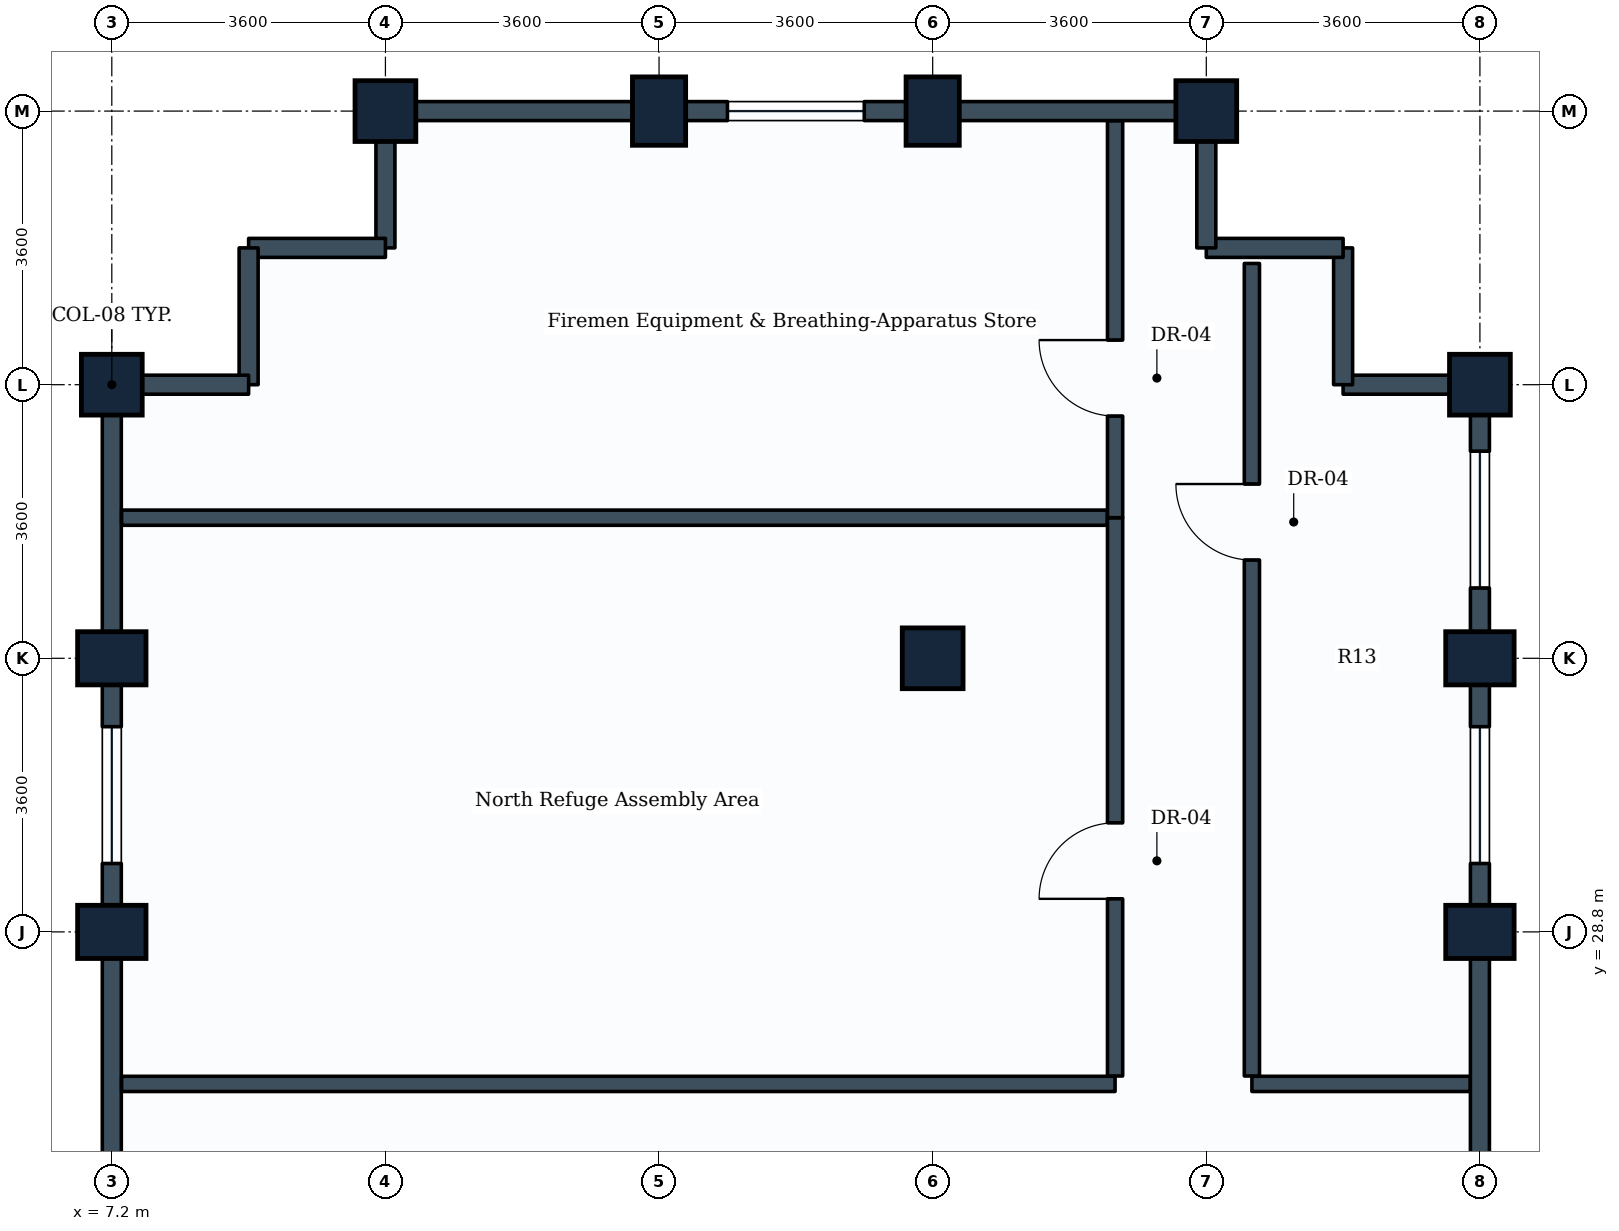
"""IFC4 building model, lengths in metres.
Left out: names, types, materials, properties, quantities, classifications, styles, units other than length and angle.
Written with IfcOpenShell. Run it as: python <this file> out.ifc"""

import sys

from ifc_helpers import new_model, si_unit, direction, frame, frame_2d, origin, origin_2d, place, context, subcontext, project, spatial, rectangle, extrude, element, fill, save


model = new_model("IFC4")
c1 = context("Model", 3, precision=1e-05, world=origin(), true_north=direction((0.0, 1.0)))
c2 = subcontext(c1, "Body", "Model", "MODEL_VIEW")
j1 = project(units=[si_unit("LENGTHUNIT", "METRE"), si_unit("PLANEANGLEUNIT", "RADIAN")], contexts=[c1])
p1 = place(None, origin())
s1 = spatial("IfcSite", under=j1, at=p1, CompositionType="ELEMENT")
p2 = place(p1, origin())
s2 = spatial("IfcBuilding", under=s1, at=p2, CompositionType="ELEMENT")
p3 = place(p2, frame((0.0, 0.0, 213.8)))
s3 = spatial("IfcBuildingStorey", under=s2, at=p3, CompositionType="ELEMENT", Elevation=213.8)
for number, where, z_axis, x_axis in (
    (1, (7.2, 28.8, 0.0), (0.0, 0.0, 1.0), (0.0, 1.0, 0.0)),
    (2, (7.2, 32.4, 0.0), (0.0, 0.0, 1.0), (0.0, 1.0, 0.0)),
):
    element("IfcColumn", number, at=place(p3, frame(where, z_axis=z_axis, x_axis=x_axis)), inside=s3, PredefinedType="COLUMN", context=c2, shape_type="SweptSolid", body=[
        extrude(rectangle(XDim=0.7, YDim=0.9, at=origin_2d()), origin(), (0.0, 0.0, 1.0), 3.6),
    ])
for number, where, z_axis, x_axis in (
    (3, (7.2, 36.0, 0.0), (0.0, 0.0, 1.0), (0.0, 1.0, 0.0)),
    (4, (10.8, 39.6, 0.0), (0.0, 0.0, 1.0), (1.0, 0.0, 0.0)),
):
    element("IfcColumn", number, at=place(p3, frame(where, z_axis=z_axis, x_axis=x_axis)), inside=s3, PredefinedType="COLUMN", context=c2, shape_type="SweptSolid", body=[
        extrude(rectangle(XDim=0.8, YDim=0.8, at=origin_2d()), origin(), (0.0, 0.0, 1.0), 3.6),
    ])
p4 = place(p3, frame((14.4, 39.6, 0.0), z_axis=(0.0, 0.0, 1.0), x_axis=(1.0, 0.0, 0.0)))
e5 = element("IfcColumn", 5, at=p4, inside=s3, PredefinedType="COLUMN", context=c2, shape_type="SweptSolid", body=[
    extrude(rectangle(XDim=0.7, YDim=0.9, at=origin_2d()), origin(), (0.0, 0.0, 1.0), 3.6),
])
p5 = place(p3, frame((18.0, 32.4, 0.0), z_axis=(0.0, 0.0, 1.0), x_axis=(1.0, 0.0, 0.0)))
e6 = element("IfcColumn", 6, at=p5, inside=s3, PredefinedType="COLUMN", context=c2, shape_type="SweptSolid", body=[
    extrude(rectangle(XDim=0.8, YDim=0.8, at=origin_2d()), origin(), (0.0, 0.0, 1.0), 3.6),
])
p6 = place(p3, frame((18.0, 39.6, 0.0), z_axis=(0.0, 0.0, 1.0), x_axis=(1.0, 0.0, 0.0)))
e7 = element("IfcColumn", 7, at=p6, inside=s3, PredefinedType="COLUMN", context=c2, shape_type="SweptSolid", body=[
    extrude(rectangle(XDim=0.7, YDim=0.9, at=origin_2d()), origin(), (0.0, 0.0, 1.0), 3.6),
])
p7 = place(p3, frame((21.6, 39.6, 0.0), z_axis=(0.0, 0.0, 1.0), x_axis=(1.0, 0.0, 0.0)))
e8 = element("IfcColumn", 8, at=p7, inside=s3, PredefinedType="COLUMN", context=c2, shape_type="SweptSolid", body=[
    extrude(rectangle(XDim=0.8, YDim=0.8, at=origin_2d()), origin(), (0.0, 0.0, 1.0), 3.6),
])
for number, where, z_axis, x_axis in (
    (9, (25.2, 28.8, 0.0), (0.0, 0.0, 1.0), (0.0, 1.0, 0.0)),
    (10, (25.2, 32.4, 0.0), (0.0, 0.0, 1.0), (0.0, 1.0, 0.0)),
):
    element("IfcColumn", number, at=place(p3, frame(where, z_axis=z_axis, x_axis=x_axis)), inside=s3, PredefinedType="COLUMN", context=c2, shape_type="SweptSolid", body=[
        extrude(rectangle(XDim=0.7, YDim=0.9, at=origin_2d()), origin(), (0.0, 0.0, 1.0), 3.6),
    ])
p8 = place(p3, frame((25.2, 36.0, 0.0), z_axis=(0.0, 0.0, 1.0), x_axis=(0.0, 1.0, 0.0)))
e11 = element("IfcColumn", 11, at=p8, inside=s3, PredefinedType="COLUMN", context=c2, shape_type="SweptSolid", body=[
    extrude(rectangle(XDim=0.8, YDim=0.8, at=origin_2d()), origin(), (0.0, 0.0, 1.0), 3.6),
])
p9 = place(p3, frame((25.2, 25.2, 0.0), z_axis=(0.0, 0.0, 1.0), x_axis=(0.0, 1.0, 0.0)))
e12 = element("IfcWall", 12, at=p9, inside=s3, PredefinedType="STANDARD", context=c2, shape_type="SweptSolid", body=[
    extrude(rectangle(XDim=3.6, YDim=0.25, at=frame_2d((1.8, 0.0))), origin(), (0.0, 0.0, 1.0), 2.73),
])
p10 = place(p3, frame((25.2, 28.8, 0.0), z_axis=(0.0, 0.0, 1.0), x_axis=(0.0, 1.0, 0.0)))
e13 = element("IfcWall", 13, at=p10, inside=s3, PredefinedType="STANDARD", context=c2, shape_type="SweptSolid", body=[
    extrude(rectangle(XDim=3.6, YDim=0.25, at=frame_2d((1.8, 0.0))), origin(), (0.0, 0.0, 1.0), 2.73),
])
p11 = place(p10, frame((0.9, 0.0, 0.85)))
e14 = element("IfcOpeningElement", 14, at=p11, cuts=e13, PredefinedType="OPENING", context=c2, shape_type="SweptSolid", body=[
    extrude(rectangle(XDim=1.8, YDim=1.35, at=frame_2d((0.9, 0.675))), frame((0.0, 0.135, 0.0), z_axis=(0.0, -1.0, 0.0), x_axis=(1.0, 0.0, 0.0)), (0.0, 0.0, 1.0), 0.27),
])
p12 = place(p3, frame((25.2, 32.4, 0.0), z_axis=(0.0, 0.0, 1.0), x_axis=(0.0, 1.0, 0.0)))
e15 = element("IfcWall", 15, at=p12, inside=s3, PredefinedType="STANDARD", context=c2, shape_type="SweptSolid", body=[
    extrude(rectangle(XDim=3.6, YDim=0.25, at=frame_2d((1.8, 0.0))), origin(), (0.0, 0.0, 1.0), 2.73),
])
p13 = place(p12, frame((0.925, 0.0, 0.85)))
e16 = element("IfcOpeningElement", 16, at=p13, cuts=e15, PredefinedType="OPENING", context=c2, shape_type="SweptSolid", body=[
    extrude(rectangle(XDim=1.8, YDim=1.35, at=frame_2d((0.9, 0.675))), frame((0.0, 0.135, 0.0), z_axis=(0.0, -1.0, 0.0), x_axis=(1.0, 0.0, 0.0)), (0.0, 0.0, 1.0), 0.27),
])
p14 = place(p3, frame((23.4, 36.0, 0.0), z_axis=(0.0, 0.0, 1.0), x_axis=(1.0, 0.0, 0.0)))
e17 = element("IfcWall", 17, at=p14, inside=s3, PredefinedType="STANDARD", context=c2, shape_type="SweptSolid", body=[
    extrude(rectangle(XDim=1.8, YDim=0.25, at=frame_2d((0.9, 0.0))), origin(), (0.0, 0.0, 1.0), 2.73),
])
p15 = place(p3, frame((23.4, 36.0, 0.0), z_axis=(0.0, 0.0, 1.0), x_axis=(0.0, 1.0, 0.0)))
e18 = element("IfcWall", 18, at=p15, inside=s3, PredefinedType="STANDARD", context=c2, shape_type="SweptSolid", body=[
    extrude(rectangle(XDim=1.8, YDim=0.25, at=frame_2d((0.9, 0.0))), origin(), (0.0, 0.0, 1.0), 3.335),
])
p16 = place(p3, frame((21.6, 37.8, 0.0), z_axis=(0.0, 0.0, 1.0), x_axis=(1.0, 0.0, 0.0)))
e19 = element("IfcWall", 19, at=p16, inside=s3, PredefinedType="STANDARD", context=c2, shape_type="SweptSolid", body=[
    extrude(rectangle(XDim=1.8, YDim=0.25, at=frame_2d((0.9, 0.0))), origin(), (0.0, 0.0, 1.0), 3.335),
])
p17 = place(p3, frame((21.6, 37.8, 0.0), z_axis=(0.0, 0.0, 1.0), x_axis=(0.0, 1.0, 0.0)))
e20 = element("IfcWall", 20, at=p17, inside=s3, PredefinedType="STANDARD", context=c2, shape_type="SweptSolid", body=[
    extrude(rectangle(XDim=1.8, YDim=0.25, at=frame_2d((0.9, 0.0))), origin(), (0.0, 0.0, 1.0), 2.73),
])
p18 = place(p3, frame((18.0, 39.6, 0.0), z_axis=(0.0, 0.0, 1.0), x_axis=(1.0, 0.0, 0.0)))
e21 = element("IfcWall", 21, at=p18, inside=s3, PredefinedType="STANDARD", context=c2, shape_type="SweptSolid", body=[
    extrude(rectangle(XDim=3.6, YDim=0.25, at=frame_2d((1.8, 0.0))), origin(), (0.0, 0.0, 1.0), 2.73),
])
p19 = place(p3, frame((14.4, 39.6, 0.0), z_axis=(0.0, 0.0, 1.0), x_axis=(1.0, 0.0, 0.0)))
e22 = element("IfcWall", 22, at=p19, inside=s3, PredefinedType="STANDARD", context=c2, shape_type="SweptSolid", body=[
    extrude(rectangle(XDim=3.6, YDim=0.25, at=frame_2d((1.8, 0.0))), origin(), (0.0, 0.0, 1.0), 2.73),
])
p20 = place(p19, frame((0.9, 0.0, 0.85)))
e23 = element("IfcOpeningElement", 23, at=p20, cuts=e22, PredefinedType="OPENING", context=c2, shape_type="SweptSolid", body=[
    extrude(rectangle(XDim=1.8, YDim=1.35, at=frame_2d((0.9, 0.675))), frame((0.0, 0.135, 0.0), z_axis=(0.0, -1.0, 0.0), x_axis=(1.0, 0.0, 0.0)), (0.0, 0.0, 1.0), 0.27),
])
p21 = place(p3, frame((10.8, 39.6, 0.0), z_axis=(0.0, 0.0, 1.0), x_axis=(1.0, 0.0, 0.0)))
e24 = element("IfcWall", 24, at=p21, inside=s3, PredefinedType="STANDARD", context=c2, shape_type="SweptSolid", body=[
    extrude(rectangle(XDim=3.6, YDim=0.25, at=frame_2d((1.8, 0.0))), origin(), (0.0, 0.0, 1.0), 2.73),
])
p22 = place(p3, frame((10.8, 37.8, 0.0), z_axis=(0.0, 0.0, 1.0), x_axis=(0.0, 1.0, 0.0)))
e25 = element("IfcWall", 25, at=p22, inside=s3, PredefinedType="STANDARD", context=c2, shape_type="SweptSolid", body=[
    extrude(rectangle(XDim=1.8, YDim=0.25, at=frame_2d((0.9, 0.0))), origin(), (0.0, 0.0, 1.0), 2.73),
])
for number, where, z_axis, x_axis in (
    (26, (9.0, 37.8, 0.0), (0.0, 0.0, 1.0), (1.0, 0.0, 0.0)),
    (27, (9.0, 36.0, 0.0), (0.0, 0.0, 1.0), (0.0, 1.0, 0.0)),
):
    element("IfcWall", number, at=place(p3, frame(where, z_axis=z_axis, x_axis=x_axis)), inside=s3, PredefinedType="STANDARD", context=c2, shape_type="SweptSolid", body=[
        extrude(rectangle(XDim=1.8, YDim=0.25, at=frame_2d((0.9, 0.0))), origin(), (0.0, 0.0, 1.0), 3.335),
    ])
p23 = place(p3, frame((7.2, 36.0, 0.0), z_axis=(0.0, 0.0, 1.0), x_axis=(1.0, 0.0, 0.0)))
e28 = element("IfcWall", 28, at=p23, inside=s3, PredefinedType="STANDARD", context=c2, shape_type="SweptSolid", body=[
    extrude(rectangle(XDim=1.8, YDim=0.25, at=frame_2d((0.9, 0.0))), origin(), (0.0, 0.0, 1.0), 2.73),
])
p24 = place(p3, frame((7.2, 32.4, 0.0), z_axis=(0.0, 0.0, 1.0), x_axis=(0.0, 1.0, 0.0)))
e29 = element("IfcWall", 29, at=p24, inside=s3, PredefinedType="STANDARD", context=c2, shape_type="SweptSolid", body=[
    extrude(rectangle(XDim=3.6, YDim=0.25, at=frame_2d((1.8, 0.0))), origin(), (0.0, 0.0, 1.0), 2.73),
])
p25 = place(p3, frame((7.2, 28.8, 0.0), z_axis=(0.0, 0.0, 1.0), x_axis=(0.0, 1.0, 0.0)))
e30 = element("IfcWall", 30, at=p25, inside=s3, PredefinedType="STANDARD", context=c2, shape_type="SweptSolid", body=[
    extrude(rectangle(XDim=3.6, YDim=0.25, at=frame_2d((1.8, 0.0))), origin(), (0.0, 0.0, 1.0), 2.73),
])
p26 = place(p25, frame((0.9, 0.0, 0.85)))
e31 = element("IfcOpeningElement", 31, at=p26, cuts=e30, PredefinedType="OPENING", context=c2, shape_type="SweptSolid", body=[
    extrude(rectangle(XDim=1.8, YDim=1.35, at=frame_2d((0.9, 0.675))), frame((0.0, 0.135, 0.0), z_axis=(0.0, -1.0, 0.0), x_axis=(1.0, 0.0, 0.0)), (0.0, 0.0, 1.0), 0.27),
])
p27 = place(p3, frame((7.2, 25.2, 0.0), z_axis=(0.0, 0.0, 1.0), x_axis=(0.0, 1.0, 0.0)))
e32 = element("IfcWall", 32, at=p27, inside=s3, PredefinedType="STANDARD", context=c2, shape_type="SweptSolid", body=[
    extrude(rectangle(XDim=3.6, YDim=0.25, at=frame_2d((1.8, 0.0))), origin(), (0.0, 0.0, 1.0), 2.73),
])
p28 = place(p3, frame((7.329, 26.8, 0.0), z_axis=(0.0, 0.0, 1.0), x_axis=(1.0, 0.0, 0.0)))
e33 = element("IfcWall", 33, at=p28, inside=s3, PredefinedType="PARTITIONING", context=c2, shape_type="SweptSolid", body=[
    extrude(rectangle(XDim=13.071, YDim=0.2, at=frame_2d((6.535, 0.0))), origin(), (0.0, 0.0, 1.0), 2.73),
])
p29 = place(p3, frame((22.2, 26.8, 0.0), z_axis=(0.0, 0.0, 1.0), x_axis=(1.0, 0.0, 0.0)))
e34 = element("IfcWall", 34, at=p29, inside=s3, PredefinedType="PARTITIONING", context=c2, shape_type="SweptSolid", body=[
    extrude(rectangle(XDim=2.871, YDim=0.2, at=frame_2d((1.436, 0.0))), origin(), (0.0, 0.0, 1.0), 2.73),
])
p30 = place(p3, frame((20.4, 26.904, 0.0), z_axis=(0.0, 0.0, 1.0), x_axis=(0.0, 1.0, 0.0)))
e35 = element("IfcWall", 35, at=p30, inside=s3, PredefinedType="PARTITIONING", context=c2, shape_type="SweptSolid", body=[
    extrude(rectangle(XDim=7.346, YDim=0.2, at=frame_2d((3.673, 0.0))), origin(), (0.0, 0.0, 1.0), 3.03),
])
p31 = place(p30, frame((2.331, 0.0, 0.0)))
e36 = element("IfcOpeningElement", 36, at=p31, cuts=e35, PredefinedType="OPENING", context=c2, shape_type="SweptSolid", body=[
    extrude(rectangle(XDim=1.0, YDim=2.1, at=frame_2d((0.5, 1.05))), frame((0.0, 0.11, 0.0), z_axis=(0.0, -1.0, 0.0), x_axis=(1.0, 0.0, 0.0)), (0.0, 0.0, 1.0), 0.22),
])
p32 = place(p3, frame((20.4, 34.25, 0.0), z_axis=(0.0, 0.0, 1.0), x_axis=(0.0, 1.0, 0.0)))
e37 = element("IfcWall", 37, at=p32, inside=s3, PredefinedType="PARTITIONING", context=c2, shape_type="SweptSolid", body=[
    extrude(rectangle(XDim=5.221, YDim=0.2, at=frame_2d((2.61, 0.0))), origin(), (0.0, 0.0, 1.0), 2.73),
])
p33 = place(p32, frame((1.337, 0.0, 0.0)))
e38 = element("IfcOpeningElement", 38, at=p33, cuts=e37, PredefinedType="OPENING", context=c2, shape_type="SweptSolid", body=[
    extrude(rectangle(XDim=1.0, YDim=2.1, at=frame_2d((0.5, 1.05))), frame((0.0, 0.11, 0.0), z_axis=(0.0, -1.0, 0.0), x_axis=(1.0, 0.0, 0.0)), (0.0, 0.0, 1.0), 0.22),
])
p34 = place(p3, frame((7.329, 34.25, 0.0), z_axis=(0.0, 0.0, 1.0), x_axis=(1.0, 0.0, 0.0)))
e39 = element("IfcWall", 39, at=p34, inside=s3, PredefinedType="PARTITIONING", context=c2, shape_type="SweptSolid", body=[
    extrude(rectangle(XDim=12.967, YDim=0.2, at=frame_2d((6.483, 0.0))), origin(), (0.0, 0.0, 1.0), 2.73),
])
p35 = place(p3, frame((22.2, 26.904, 0.0), z_axis=(0.0, 0.0, 1.0), x_axis=(0.0, 1.0, 0.0)))
e40 = element("IfcWall", 40, at=p35, inside=s3, PredefinedType="PARTITIONING", context=c2, shape_type="SweptSolid", body=[
    extrude(rectangle(XDim=10.691, YDim=0.2, at=frame_2d((5.345, 0.0))), origin(), (0.0, 0.0, 1.0), 3.03),
])
p36 = place(p35, frame((6.789, 0.0, 0.0)))
e41 = element("IfcOpeningElement", 41, at=p36, cuts=e40, PredefinedType="OPENING", context=c2, shape_type="SweptSolid", body=[
    extrude(rectangle(XDim=1.0, YDim=2.1, at=frame_2d((0.5, 1.05))), frame((0.0, 0.11, 0.0), z_axis=(0.0, -1.0, 0.0), x_axis=(1.0, 0.0, 0.0)), (0.0, 0.0, 1.0), 0.22),
])
p37 = place(p11, origin())
e42 = element("IfcWindow", 42, at=p37, inside=s3, PartitioningType="SINGLE_PANEL", PredefinedType="WINDOW", context=c2, shape_type="SweptSolid", body=[
    extrude(rectangle(XDim=1.8, YDim=1.35, at=frame_2d((0.9, 0.675))), frame((0.0, 0.03, 0.0), z_axis=(0.0, -1.0, 0.0), x_axis=(1.0, 0.0, 0.0)), (0.0, 0.0, 1.0), 0.06),
])
fill(e14, e42)
p38 = place(p13, origin())
e43 = element("IfcWindow", 43, at=p38, inside=s3, PartitioningType="SINGLE_PANEL", PredefinedType="WINDOW", context=c2, shape_type="SweptSolid", body=[
    extrude(rectangle(XDim=1.8, YDim=1.35, at=frame_2d((0.9, 0.675))), frame((0.0, 0.03, 0.0), z_axis=(0.0, -1.0, 0.0), x_axis=(1.0, 0.0, 0.0)), (0.0, 0.0, 1.0), 0.06),
])
fill(e16, e43)
p39 = place(p20, origin())
e44 = element("IfcWindow", 44, at=p39, inside=s3, PartitioningType="SINGLE_PANEL", PredefinedType="WINDOW", context=c2, shape_type="SweptSolid", body=[
    extrude(rectangle(XDim=1.8, YDim=1.35, at=frame_2d((0.9, 0.675))), frame((0.0, 0.03, 0.0), z_axis=(0.0, -1.0, 0.0), x_axis=(1.0, 0.0, 0.0)), (0.0, 0.0, 1.0), 0.06),
])
fill(e23, e44)
p40 = place(p26, origin())
e45 = element("IfcWindow", 45, at=p40, inside=s3, PartitioningType="SINGLE_PANEL", PredefinedType="WINDOW", context=c2, shape_type="SweptSolid", body=[
    extrude(rectangle(XDim=1.8, YDim=1.35, at=frame_2d((0.9, 0.675))), frame((0.0, 0.03, 0.0), z_axis=(0.0, -1.0, 0.0), x_axis=(1.0, 0.0, 0.0)), (0.0, 0.0, 1.0), 0.06),
])
fill(e31, e45)
p41 = place(p31, origin())
e46 = element("IfcDoor", 46, at=p41, inside=s3, OperationType="SINGLE_SWING_LEFT", PredefinedType="DOOR", context=c2, shape_type="SweptSolid", body=[
    extrude(rectangle(XDim=1.0, YDim=2.1, at=frame_2d((0.5, 1.05))), frame((0.0, 0.025, 0.0), z_axis=(0.0, -1.0, 0.0), x_axis=(1.0, 0.0, 0.0)), (0.0, 0.0, 1.0), 0.05),
])
fill(e36, e46)
p42 = place(p33, origin())
e47 = element("IfcDoor", 47, at=p42, inside=s3, OperationType="SINGLE_SWING_RIGHT", PredefinedType="DOOR", context=c2, shape_type="SweptSolid", body=[
    extrude(rectangle(XDim=1.0, YDim=2.1, at=frame_2d((0.5, 1.05))), frame((0.0, 0.025, 0.0), z_axis=(0.0, -1.0, 0.0), x_axis=(1.0, 0.0, 0.0)), (0.0, 0.0, 1.0), 0.05),
])
fill(e38, e47)
p43 = place(p36, origin())
e48 = element("IfcDoor", 48, at=p43, inside=s3, OperationType="SINGLE_SWING_RIGHT", PredefinedType="DOOR", context=c2, shape_type="SweptSolid", body=[
    extrude(rectangle(XDim=1.0, YDim=2.1, at=frame_2d((0.5, 1.05))), frame((0.0, 0.025, 0.0), z_axis=(0.0, -1.0, 0.0), x_axis=(1.0, 0.0, 0.0)), (0.0, 0.0, 1.0), 0.05),
])
fill(e41, e48)
save(model, sys.argv[1])
